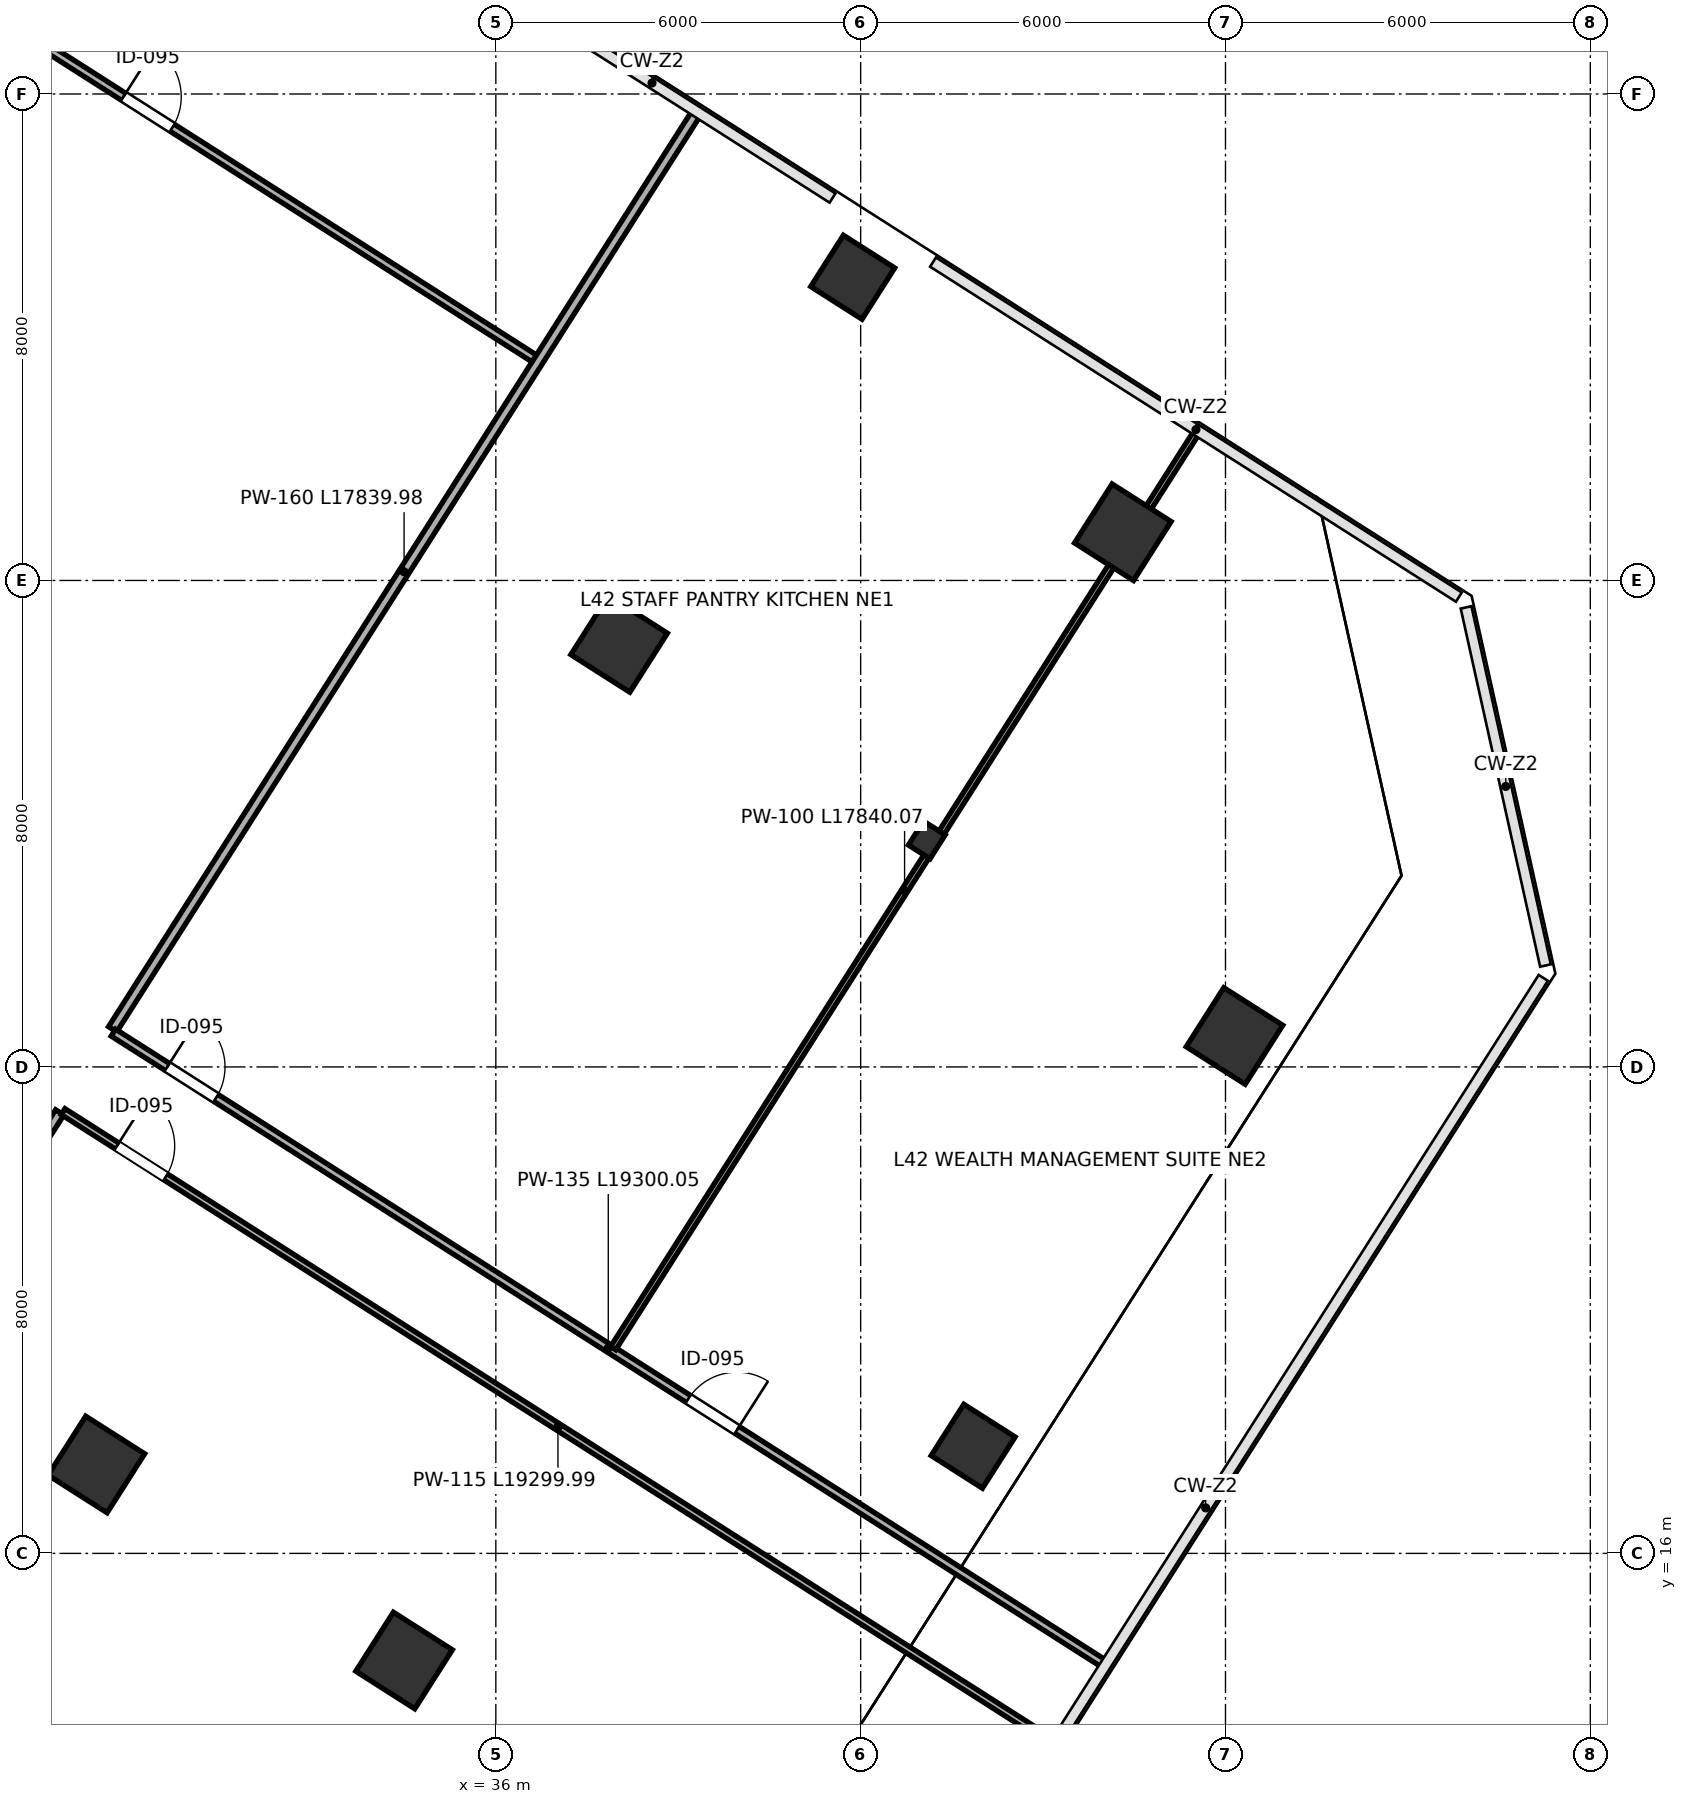
"""IFC4 building model, lengths in metres.
Left out: names, types, materials, properties, quantities, classifications, styles, units other than length and angle.
Written with IfcOpenShell. Run it as: python <this file> out.ifc"""

import sys

from ifc_helpers import new_model, si_unit, direction, frame, frame_2d, origin, origin_2d, place, context, subcontext, project, spatial, rectangle, i_section, extrude, source, transform, mapped, element, fill, save


model = new_model("IFC4")
c1 = context("Model", 3, precision=1e-05, world=origin(), true_north=direction((0.0, 1.0)))
c2 = subcontext(c1, "Body", "Model", "MODEL_VIEW")
j1 = project(units=[si_unit("LENGTHUNIT", "METRE"), si_unit("PLANEANGLEUNIT", "RADIAN")], contexts=[c1])
p1 = place(None, origin())
s1 = spatial("IfcSite", under=j1, at=p1, CompositionType="ELEMENT")
p2 = place(p1, origin())
s2 = spatial("IfcBuilding", under=s1, at=p2, CompositionType="ELEMENT")
p3 = place(p2, frame((0.0, 0.0, 187.6)))
s3 = spatial("IfcBuildingStorey", under=s2, at=p3, CompositionType="ELEMENT", Elevation=187.6)
m1 = source(origin(), c2, "Body", "SweptSolid", [
    extrude(rectangle(XDim=1.15, YDim=1.15, at=origin_2d()), origin(), (0.0, 0.0, 1.0), 4.198),
])
for number, where, z_axis, x_axis in (
    (1, (29.431, 17.462, 0.001), (0.0, 0.0, 1.0), (-0.843, 0.537, 0.0)),
    (2, (38.028, 30.956, 0.001), (0.0, 0.0, 1.0), (-0.843, 0.537, 0.0)),
):
    element("IfcColumn", number, at=place(p3, frame(where, z_axis=z_axis, x_axis=x_axis)), inside=s3, PredefinedType="COLUMN", context=c2, shape_type="MappedRepresentation", body=[
        mapped(m1, transform((0.0, 0.0, 0.0), scale=1.0)),
    ])
m2 = source(origin(), c2, "Body", "SweptSolid", [
    extrude(rectangle(XDim=1.0, YDim=1.0, at=origin_2d()), origin(), (0.0, 0.0, 1.0), 4.198),
])
p4 = place(p3, frame((41.869, 36.987, 0.001), z_axis=(0.0, 0.0, 1.0), x_axis=(-0.843391445813, 0.537299608347, 0.0)))
e3 = element("IfcColumn", 3, at=p4, inside=s3, PredefinedType="COLUMN", context=c2, shape_type="MappedRepresentation", body=[
    mapped(m2, transform((0.0, 0.0, 0.0), scale=1.0)),
])
p5 = place(p3, frame((34.491, 14.238, 0.001), z_axis=(0.0, 0.0, 1.0), x_axis=(-0.843391445813, 0.537299608347, 0.0)))
e4 = element("IfcColumn", 4, at=p5, inside=s3, PredefinedType="COLUMN", context=c2, shape_type="MappedRepresentation", body=[
    mapped(m1, transform((0.0, 0.0, 0.0), scale=1.0)),
])
m3 = source(origin(), c2, "Body", "SweptSolid", [
    extrude(i_section(OverallWidth=0.421, OverallDepth=0.465, WebThickness=0.045, FlangeThickness=0.072, FilletRadius=0.015, at=origin_2d()), origin(), (0.0, 0.0, 1.0), 4.198),
])
p6 = place(p3, frame((43.088, 27.732, 0.001), z_axis=(0.0, 0.0, 1.0), x_axis=(-0.843391445813, 0.537299608347, 0.0)))
e5 = element("IfcColumn", 5, at=p6, inside=s3, PredefinedType="COLUMN", context=c2, shape_type="MappedRepresentation", body=[
    mapped(m3, transform((0.0, 0.0, 0.0), scale=1.0)),
])
p7 = place(p3, frame((46.312, 32.793, 0.001), z_axis=(0.0, 0.0, 1.0), x_axis=(-0.843391445813, 0.537299608347, 0.0)))
e6 = element("IfcColumn", 6, at=p7, inside=s3, PredefinedType="COLUMN", context=c2, shape_type="MappedRepresentation", body=[
    mapped(m1, transform((0.0, 0.0, 0.0), scale=1.0)),
])
p8 = place(p3, frame((43.85, 17.762, 0.001), z_axis=(0.0, 0.0, 1.0), x_axis=(-0.843391445813, 0.537299608347, 0.0)))
e7 = element("IfcColumn", 7, at=p8, inside=s3, PredefinedType="COLUMN", context=c2, shape_type="MappedRepresentation", body=[
    mapped(m2, transform((0.0, 0.0, 0.0), scale=1.0)),
])
m4 = source(origin(), c2, "Body", "SweptSolid", [
    extrude(rectangle(XDim=1.15, YDim=1.15, at=origin_2d()), origin(), (0.0, 0.0, 1.0), 4.198),
])
p9 = place(p3, frame((48.148, 24.509, 0.001), z_axis=(0.0, 0.0, 1.0), x_axis=(-0.843391445813, 0.537299608347, 0.0)))
e8 = element("IfcColumn", 8, at=p9, inside=s3, PredefinedType="COLUMN", context=c2, shape_type="MappedRepresentation", body=[
    mapped(m4, transform((0.0, 0.0, 0.0), scale=1.0)),
])
p10 = place(p3, frame((12.747, 50.868, 0.0), z_axis=(0.0, 0.0, 1.0), x_axis=(0.843393047262, -0.537297094567, 0.0)))
e9 = element("IfcWall", 9, at=p10, inside=s3, PredefinedType="PARTITIONING", context=c2, shape_type="SweptSolid", body=[
    extrude(rectangle(XDim=28.36, YDim=0.135, at=frame_2d((14.18, 0.0))), origin(), (0.0, 0.0, 1.0), 3.96),
])
p11 = place(p10, frame((20.31, 0.0, 0.0)))
e10 = element("IfcOpeningElement", 10, at=p11, cuts=e9, PredefinedType="OPENING", context=c2, shape_type="SweptSolid", body=[
    extrude(rectangle(XDim=0.95, YDim=2.15, at=frame_2d((0.475, 1.075))), frame((0.0, 0.078, 0.0), z_axis=(0.0, -1.0, 0.0), x_axis=(1.0, 0.0, 0.0)), (0.0, 0.0, 1.0), 0.155),
])
p12 = place(p3, frame((29.698, 24.619, 0.0), z_axis=(0.0, 0.0, 1.0), x_axis=(0.537299578138, 0.843391465058, 0.0)))
e11 = element("IfcWall", 11, at=p12, inside=s3, PredefinedType="PARTITIONING", context=c2, shape_type="SweptSolid", body=[
    extrude(rectangle(XDim=17.84, YDim=0.16, at=frame_2d((8.92, 0.0))), origin(), (0.0, 0.0, 1.0), 3.195),
])
p13 = place(p3, frame((21.014, 10.988, 0.0), z_axis=(0.0, 0.0, 1.0), x_axis=(0.537301260837, 0.843390393058, 0.0)))
e12 = element("IfcWall", 12, at=p13, inside=s3, PredefinedType="PARTITIONING", context=c2, shape_type="SweptSolid", body=[
    extrude(rectangle(XDim=14.542, YDim=0.16, at=frame_2d((7.271, 0.0))), origin(), (0.0, 0.0, 1.0), 3.96),
])
p14 = place(p3, frame((29.71, 24.564, 0.0), z_axis=(0.0, 0.0, 1.0), x_axis=(0.843390003721, -0.537301871971, 0.0)))
e13 = element("IfcWall", 13, at=p14, inside=s3, PredefinedType="PARTITIONING", context=c2, shape_type="SweptSolid", body=[
    extrude(rectangle(XDim=19.3, YDim=0.135, at=frame_2d((9.65, 0.0))), origin(), (0.0, 0.0, 1.0), 3.252),
])
p15 = place(p14, frame((1.05, 0.0, 0.0)))
e14 = element("IfcOpeningElement", 14, at=p15, cuts=e13, PredefinedType="OPENING", context=c2, shape_type="SweptSolid", body=[
    extrude(rectangle(XDim=0.95, YDim=2.15, at=frame_2d((0.475, 1.075))), frame((0.0, 0.078, 0.0), z_axis=(0.0, -1.0, 0.0), x_axis=(1.0, 0.0, 0.0)), (0.0, 0.0, 1.0), 0.155),
])
p16 = place(p14, frame((11.21, 0.0, 0.0)))
e15 = element("IfcOpeningElement", 15, at=p16, cuts=e13, PredefinedType="OPENING", context=c2, shape_type="SweptSolid", body=[
    extrude(rectangle(XDim=0.95, YDim=2.15, at=frame_2d((0.475, 1.075))), frame((0.0, 0.078, 0.0), z_axis=(0.0, -1.0, 0.0), x_axis=(1.0, 0.0, 0.0)), (0.0, 0.0, 1.0), 0.155),
])
p17 = place(p3, frame((28.883, 23.265, 0.0), z_axis=(0.0, 0.0, 1.0), x_axis=(0.843390003721, -0.537301871971, 0.0)))
e16 = element("IfcWall", 16, at=p17, inside=s3, PredefinedType="PARTITIONING", context=c2, shape_type="SweptSolid", body=[
    extrude(rectangle(XDim=19.3, YDim=0.115, at=frame_2d((9.65, 0.0))), origin(), (0.0, 0.0, 1.0), 3.252),
])
p18 = place(p17, frame((1.05, 0.0, 0.0)))
e17 = element("IfcOpeningElement", 17, at=p18, cuts=e16, PredefinedType="OPENING", context=c2, shape_type="SweptSolid", body=[
    extrude(rectangle(XDim=0.95, YDim=2.15, at=frame_2d((0.475, 1.075))), frame((0.0, 0.067, 0.0), z_axis=(0.0, -1.0, 0.0), x_axis=(1.0, 0.0, 0.0)), (0.0, 0.0, 1.0), 0.135),
])
p19 = place(p3, frame((37.93, 19.375, 0.0), z_axis=(0.0, 0.0, 1.0), x_axis=(0.537293376795, 0.843395415717, 0.0)))
e18 = element("IfcWall", 18, at=p19, inside=s3, PredefinedType="PARTITIONING", context=c2, shape_type="SweptSolid", body=[
    extrude(rectangle(XDim=17.84, YDim=0.1, at=frame_2d((8.92, 0.0))), origin(), (0.0, 0.0, 1.0), 3.96),
])
m5 = source(origin(), c2, "Body", "SweptSolid", [
    extrude(rectangle(XDim=0.95, YDim=2.15, at=frame_2d((0.475, 1.075))), frame((0.0, 0.025, 0.0), z_axis=(0.0, -1.0, 0.0), x_axis=(1.0, 0.0, 0.0)), (0.0, 0.0, 1.0), 0.05),
])
p20 = place(p11, origin())
e19 = element("IfcDoor", 19, at=p20, inside=s3, OperationType="SINGLE_SWING_LEFT", PredefinedType="DOOR", context=c2, shape_type="MappedRepresentation", body=[
    mapped(m5, transform((0.0, 0.0, 0.0), scale=1.0)),
])
fill(e10, e19)
p21 = place(p15, origin())
e20 = element("IfcDoor", 20, at=p21, inside=s3, OperationType="SINGLE_SWING_LEFT", PredefinedType="DOOR", context=c2, shape_type="MappedRepresentation", body=[
    mapped(m5, transform((0.0, 0.0, 0.0), scale=1.0)),
])
fill(e14, e20)
p22 = place(p16, origin())
e21 = element("IfcDoor", 21, at=p22, inside=s3, OperationType="SINGLE_SWING_RIGHT", PredefinedType="DOOR", context=c2, shape_type="MappedRepresentation", body=[
    mapped(m5, transform((0.0, 0.0, 0.0), scale=1.0)),
])
fill(e15, e21)
p23 = place(p18, origin())
e22 = element("IfcDoor", 22, at=p23, inside=s3, OperationType="SINGLE_SWING_LEFT", PredefinedType="DOOR", context=c2, shape_type="MappedRepresentation", body=[
    mapped(m5, transform((0.0, 0.0, 0.0), scale=1.0)),
])
fill(e17, e22)
save(model, sys.argv[1])
